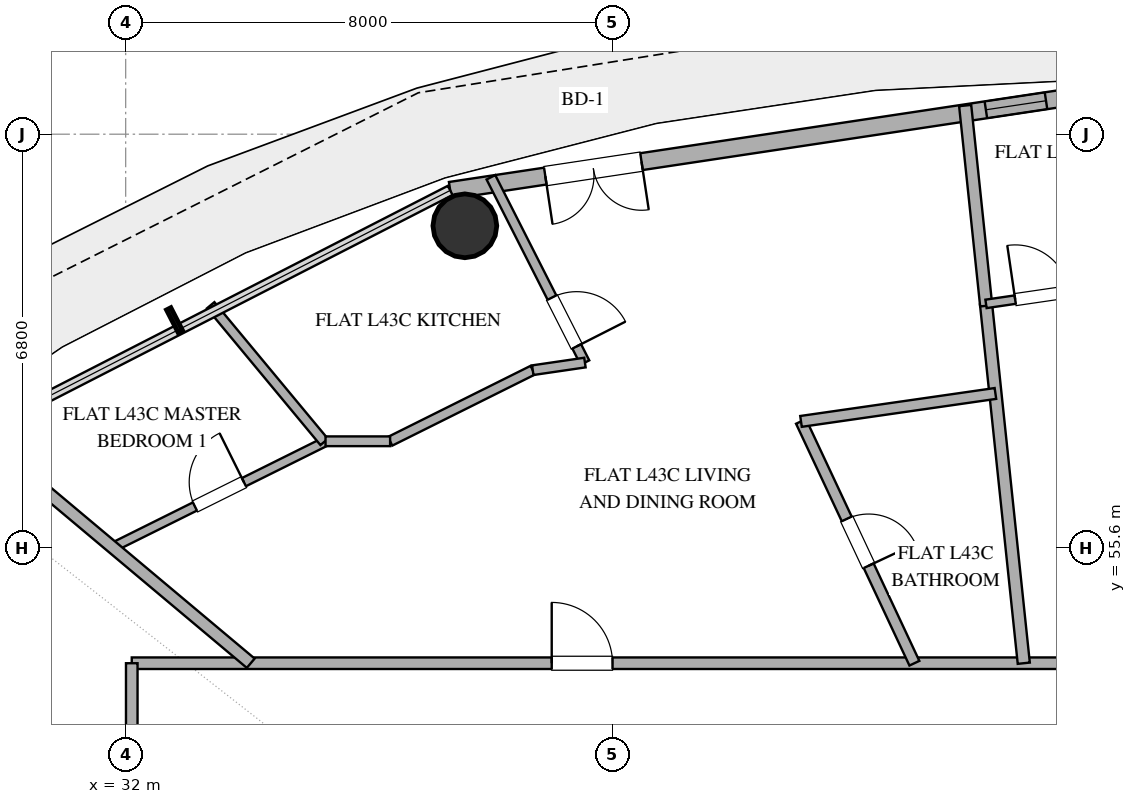
"""IFC4 building model, lengths in metres.
Left out: names, types, materials, properties, quantities, classifications, styles, units other than length and angle.
Written with IfcOpenShell. Run it as: python <this file> out.ifc"""

import sys

from ifc_helpers import new_model, si_unit, direction, frame, frame_2d, origin, origin_2d, place, context, subcontext, project, spatial, rectangle, hollow_circle, extrude, element, fill, save


model = new_model("IFC4")
c1 = context("Model", 3, precision=1e-05, world=origin(), true_north=direction((0.0, 1.0)))
c2 = subcontext(c1, "Body", "Model", "MODEL_VIEW")
j1 = project(units=[si_unit("LENGTHUNIT", "METRE"), si_unit("PLANEANGLEUNIT", "RADIAN")], contexts=[c1])
p1 = place(None, origin())
s1 = spatial("IfcSite", under=j1, at=p1, CompositionType="ELEMENT")
p2 = place(p1, origin())
s2 = spatial("IfcBuilding", under=s1, at=p2, CompositionType="ELEMENT")
p3 = place(p2, frame((0.0, 0.0, 172.2)))
s3 = spatial("IfcBuildingStorey", under=s2, at=p3, CompositionType="ELEMENT", Elevation=172.2)
p4 = place(p3, frame((37.578, 60.893, 0.0), z_axis=(0.0, 0.0, 1.0), x_axis=(1.0, 0.0, 0.0)))
e1 = element("IfcColumn", 1, at=p4, inside=s3, PredefinedType="COLUMN", context=c2, shape_type="SweptSolid", body=[
    extrude(hollow_circle(Radius=0.525, WallThickness=0.028, at=origin_2d()), origin(), (0.0, 0.0, 1.0), 3.38),
])
p5 = place(p3, frame((48.0, 63.08, 0.0), z_axis=(0.0, 0.0, 1.0), x_axis=(-0.988863993413, -0.148822049884, 0.0)))
e2 = element("IfcWall", 2, at=p5, inside=s3, PredefinedType="SOLIDWALL", context=c2, shape_type="SweptSolid", body=[
    extrude(rectangle(XDim=10.783, YDim=0.28, at=frame_2d((5.392, 0.0))), origin(), (0.0, 0.0, 1.0), 3.38),
])
p6 = place(p5, frame((7.601, 0.0, 0.0)))
e3 = element("IfcOpeningElement", 3, at=p6, cuts=e2, PredefinedType="OPENING", context=c2, shape_type="SweptSolid", body=[
    extrude(rectangle(XDim=1.6, YDim=2.25, at=frame_2d((0.8, 1.125))), frame((0.0, 0.15, 0.0), z_axis=(0.0, -1.0, 0.0), x_axis=(1.0, 0.0, 0.0)), (0.0, 0.0, 1.0), 0.3),
])
p7 = place(p5, frame((0.874, 0.0, 0.85)))
e4 = element("IfcOpeningElement", 4, at=p7, cuts=e2, PredefinedType="OPENING", context=c2, shape_type="SweptSolid", body=[
    extrude(rectangle(XDim=1.0, YDim=1.8, at=frame_2d((0.5, 0.9))), frame((0.0, 0.15, 0.0), z_axis=(0.0, -1.0, 0.0), x_axis=(1.0, 0.0, 0.0)), (0.0, 0.0, 1.0), 0.3),
])
p8 = place(p3, frame((32.1, 53.7, 0.0), z_axis=(0.0, 0.0, 1.0), x_axis=(1.0, 0.0, 0.0)))
e5 = element("IfcWall", 5, at=p8, inside=s3, PredefinedType="PARTITIONING", context=c2, shape_type="SweptSolid", body=[
    extrude(rectangle(XDim=16.061, YDim=0.19, at=frame_2d((8.03, 0.0))), origin(), (0.0, 0.0, 1.0), 2.74),
])
p9 = place(p8, frame((6.907, 0.0, 0.0)))
e6 = element("IfcOpeningElement", 6, at=p9, cuts=e5, PredefinedType="OPENING", context=c2, shape_type="SweptSolid", body=[
    extrude(rectangle(XDim=1.0, YDim=2.2, at=frame_2d((0.5, 1.1))), frame((0.0, 0.105, 0.0), z_axis=(0.0, -1.0, 0.0), x_axis=(1.0, 0.0, 0.0)), (0.0, 0.0, 1.0), 0.21),
])
p10 = place(p3, frame((32.1, 46.526, 0.0), z_axis=(0.0, 0.0, 1.0), x_axis=(0.0, 1.0, 0.0)))
e7 = element("IfcWall", 7, at=p10, inside=s3, PredefinedType="PARTITIONING", context=c2, shape_type="SweptSolid", body=[
    extrude(rectangle(XDim=7.174, YDim=0.19, at=frame_2d((3.587, 0.0))), origin(), (0.0, 0.0, 1.0), 2.74),
])
p11 = place(p10, frame((3.087, 0.0, 0.0)))
e8 = element("IfcOpeningElement", 8, at=p11, cuts=e7, PredefinedType="OPENING", context=c2, shape_type="SweptSolid", body=[
    extrude(rectangle(XDim=1.0, YDim=2.2, at=frame_2d((0.5, 1.1))), frame((0.0, 0.105, 0.0), z_axis=(0.0, -1.0, 0.0), x_axis=(1.0, 0.0, 0.0)), (0.0, 0.0, 1.0), 0.21),
])
p12 = place(p3, frame((46.77, 53.7, 0.0), z_axis=(0.0, 0.0, 1.0), x_axis=(-0.104526512024, 0.99452210045, 0.0)))
e9 = element("IfcWall", 9, at=p12, inside=s3, PredefinedType="PARTITIONING", context=c2, shape_type="SweptSolid", body=[
    extrude(rectangle(XDim=5.942, YDim=0.2, at=frame_2d((2.971, 0.0))), origin(), (0.0, 0.0, 1.0), 2.74),
])
p13 = place(p3, frame((43.106, 57.677, 0.0), z_axis=(0.0, 0.0, 1.0), x_axis=(0.424616155392, -0.905373470221, 0.0)))
e10 = element("IfcWall", 10, at=p13, inside=s3, PredefinedType="PLUMBINGWALL", context=c2, shape_type="SweptSolid", body=[
    extrude(rectangle(XDim=4.392, YDim=0.18, at=frame_2d((2.196, 0.0))), origin(), (0.0, 0.0, 1.0), 2.74),
])
p14 = place(p13, frame((1.771, 0.0, 0.0)))
e11 = element("IfcOpeningElement", 11, at=p14, cuts=e10, PredefinedType="OPENING", context=c2, shape_type="SweptSolid", body=[
    extrude(rectangle(XDim=0.85, YDim=2.1, at=frame_2d((0.425, 1.05))), frame((0.0, 0.1, 0.0), z_axis=(0.0, -1.0, 0.0), x_axis=(1.0, 0.0, 0.0)), (0.0, 0.0, 1.0), 0.2),
])
p15 = place(p3, frame((31.786, 55.605, 0.0), z_axis=(0.0, 0.0, 1.0), x_axis=(0.895458573673, 0.445144856013, 0.0)))
e12 = element("IfcWall", 12, at=p15, inside=s3, PredefinedType="PARTITIONING", context=c2, shape_type="SweptSolid", body=[
    extrude(rectangle(XDim=3.92, YDim=0.15, at=frame_2d((1.96, 0.0))), origin(), (0.0, 0.0, 1.0), 2.74),
])
p16 = place(p15, frame((1.51, 0.0, 0.0)))
e13 = element("IfcOpeningElement", 13, at=p16, cuts=e12, PredefinedType="OPENING", context=c2, shape_type="SweptSolid", body=[
    extrude(rectangle(XDim=0.9, YDim=2.1, at=frame_2d((0.45, 1.05))), frame((0.0, 0.085, 0.0), z_axis=(0.0, -1.0, 0.0), x_axis=(1.0, 0.0, 0.0)), (0.0, 0.0, 1.0), 0.17),
])
p17 = place(p3, frame((38.007, 61.691, 0.0), z_axis=(0.0, 0.0, 1.0), x_axis=(0.452578737028, -0.891724445549, 0.0)))
e14 = element("IfcWall", 14, at=p17, inside=s3, PredefinedType="PLUMBINGWALL", context=c2, shape_type="SweptSolid", body=[
    extrude(rectangle(XDim=3.417, YDim=0.16, at=frame_2d((1.708, 0.0))), origin(), (0.0, 0.0, 1.0), 2.74),
])
p18 = place(p17, frame((2.218, 0.0, 0.0)))
e15 = element("IfcOpeningElement", 15, at=p18, cuts=e14, PredefinedType="OPENING", context=c2, shape_type="SweptSolid", body=[
    extrude(rectangle(XDim=0.9, YDim=2.1, at=frame_2d((0.45, 1.05))), frame((0.0, 0.09, 0.0), z_axis=(0.0, -1.0, 0.0), x_axis=(1.0, 0.0, 0.0)), (0.0, 0.0, 1.0), 0.18),
])
p19 = place(p3, frame((45.806, 62.871, 0.0), z_axis=(0.0, 0.0, 1.0), x_axis=(0.104531289483, -0.994521598317, 0.0)))
e16 = element("IfcWall", 16, at=p19, inside=s3, PredefinedType="PARTITIONING", context=c2, shape_type="SweptSolid", body=[
    extrude(rectangle(XDim=3.312, YDim=0.2, at=frame_2d((1.656, 0.0))), origin(), (0.0, 0.0, 1.0), 2.74),
])
p20 = place(p3, frame((46.304, 58.136, 0.0), z_axis=(0.0, 0.0, 1.0), x_axis=(-0.989822126592, -0.142310075924, 0.0)))
e17 = element("IfcWall", 17, at=p20, inside=s3, PredefinedType="PLUMBINGWALL", context=c2, shape_type="SweptSolid", body=[
    extrude(rectangle(XDim=3.23, YDim=0.18, at=frame_2d((1.615, 0.0))), origin(), (0.0, 0.0, 1.0), 2.74),
])
p21 = place(p3, frame((34.056, 53.7, 0.0), z_axis=(0.0, 0.0, 1.0), x_axis=(-0.766037176398, 0.642796269728, 0.0)))
e18 = element("IfcWall", 18, at=p21, inside=s3, PredefinedType="PARTITIONING", context=c2, shape_type="SweptSolid", body=[
    extrude(rectangle(XDim=6.004, YDim=0.2, at=frame_2d((3.002, 0.0))), origin(), (0.0, 0.0, 1.0), 2.74),
])
p22 = place(p3, frame((35.264, 57.339, 0.0), z_axis=(0.0, 0.0, 1.0), x_axis=(-0.638753509407, 0.769411433643, 0.0)))
e19 = element("IfcWall", 19, at=p22, inside=s3, PredefinedType="PLUMBINGWALL", context=c2, shape_type="SweptSolid", body=[
    extrude(rectangle(XDim=2.922, YDim=0.16, at=frame_2d((1.461, 0.0))), origin(), (0.0, 0.0, 1.0), 2.74),
])
p23 = place(p3, frame((38.695, 58.519, 0.0), z_axis=(0.0, 0.0, 1.0), x_axis=(-0.895041110332, -0.445983644112, 0.0)))
e20 = element("IfcWall", 20, at=p23, inside=s3, PredefinedType="PLUMBINGWALL", context=c2, shape_type="SweptSolid", body=[
    extrude(rectangle(XDim=2.621, YDim=0.16, at=frame_2d((1.311, 0.0))), origin(), (0.0, 0.0, 1.0), 2.74),
])
p24 = place(p3, frame((46.149, 59.609, 0.0), z_axis=(0.0, 0.0, 1.0), x_axis=(0.989487501707, 0.144618408111, 0.0)))
e21 = element("IfcWall", 21, at=p24, inside=s3, PredefinedType="PARTITIONING", context=c2, shape_type="SweptSolid", body=[
    extrude(rectangle(XDim=1.871, YDim=0.14, at=frame_2d((0.935, 0.0))), origin(), (0.0, 0.0, 1.0), 2.74),
])
p25 = place(p24, frame((0.485, 0.0, 0.0)))
e22 = element("IfcOpeningElement", 22, at=p25, cuts=e21, PredefinedType="OPENING", context=c2, shape_type="SweptSolid", body=[
    extrude(rectangle(XDim=0.9, YDim=2.1, at=frame_2d((0.45, 1.05))), frame((0.0, 0.08, 0.0), z_axis=(0.0, -1.0, 0.0), x_axis=(1.0, 0.0, 0.0)), (0.0, 0.0, 1.0), 0.16),
])
p26 = place(p3, frame((36.349, 57.35, 0.0), z_axis=(0.0, 0.0, 1.0), x_axis=(-1.0, 0.0, 0.0)))
e23 = element("IfcWall", 23, at=p26, inside=s3, PredefinedType="PLUMBINGWALL", context=c2, shape_type="SweptSolid", body=[
    extrude(rectangle(XDim=1.062, YDim=0.16, at=frame_2d((0.531, 0.0))), origin(), (0.0, 0.0, 1.0), 2.74),
])
p27 = place(p3, frame((39.553, 58.645, 0.0), z_axis=(0.0, 0.0, 1.0), x_axis=(-0.989476797437, -0.144691628416, 0.0)))
e24 = element("IfcWall", 24, at=p27, inside=s3, PredefinedType="PLUMBINGWALL", context=c2, shape_type="SweptSolid", body=[
    extrude(rectangle(XDim=0.867, YDim=0.16, at=frame_2d((0.434, 0.0))), origin(), (0.0, 0.0, 1.0), 2.74),
])
p28 = place(p6, origin())
e25 = element("IfcDoor", 25, at=p28, inside=s3, OperationType="DOUBLE_DOOR_SINGLE_SWING", PredefinedType="DOOR", context=c2, shape_type="SweptSolid", body=[
    extrude(rectangle(XDim=1.6, YDim=2.25, at=frame_2d((0.8, 1.125))), frame((0.0, 0.025, 0.0), z_axis=(0.0, -1.0, 0.0), x_axis=(1.0, 0.0, 0.0)), (0.0, 0.0, 1.0), 0.05),
])
fill(e3, e25)
p29 = place(p7, origin())
e26 = element("IfcWindow", 26, at=p29, inside=s3, PartitioningType="SINGLE_PANEL", PredefinedType="WINDOW", context=c2, shape_type="SweptSolid", body=[
    extrude(rectangle(XDim=1.0, YDim=1.8, at=frame_2d((0.5, 0.9))), frame((0.0, 0.03, 0.0), z_axis=(0.0, -1.0, 0.0), x_axis=(1.0, 0.0, 0.0)), (0.0, 0.0, 1.0), 0.06),
])
fill(e4, e26)
p30 = place(p9, origin())
e27 = element("IfcDoor", 27, at=p30, inside=s3, OperationType="SINGLE_SWING_LEFT", PredefinedType="DOOR", context=c2, shape_type="SweptSolid", body=[
    extrude(rectangle(XDim=1.0, YDim=2.2, at=frame_2d((0.5, 1.1))), frame((0.0, 0.025, 0.0), z_axis=(0.0, -1.0, 0.0), x_axis=(1.0, 0.0, 0.0)), (0.0, 0.0, 1.0), 0.05),
])
fill(e6, e27)
p31 = place(p14, origin())
e28 = element("IfcDoor", 28, at=p31, inside=s3, OperationType="SINGLE_SWING_RIGHT", PredefinedType="DOOR", context=c2, shape_type="SweptSolid", body=[
    extrude(rectangle(XDim=0.85, YDim=2.1, at=frame_2d((0.425, 1.05))), frame((0.0, 0.025, 0.0), z_axis=(0.0, -1.0, 0.0), x_axis=(1.0, 0.0, 0.0)), (0.0, 0.0, 1.0), 0.05),
])
fill(e11, e28)
p32 = place(p16, origin())
e29 = element("IfcDoor", 29, at=p32, inside=s3, OperationType="SINGLE_SWING_RIGHT", PredefinedType="DOOR", context=c2, shape_type="SweptSolid", body=[
    extrude(rectangle(XDim=0.9, YDim=2.1, at=frame_2d((0.45, 1.05))), frame((0.0, 0.025, 0.0), z_axis=(0.0, -1.0, 0.0), x_axis=(1.0, 0.0, 0.0)), (0.0, 0.0, 1.0), 0.05),
])
fill(e13, e29)
p33 = place(p18, origin())
e30 = element("IfcDoor", 30, at=p33, inside=s3, OperationType="SINGLE_SWING_RIGHT", PredefinedType="DOOR", context=c2, shape_type="SweptSolid", body=[
    extrude(rectangle(XDim=0.9, YDim=2.1, at=frame_2d((0.45, 1.05))), frame((0.0, 0.025, 0.0), z_axis=(0.0, -1.0, 0.0), x_axis=(1.0, 0.0, 0.0)), (0.0, 0.0, 1.0), 0.05),
])
fill(e15, e30)
p34 = place(p25, origin())
e31 = element("IfcDoor", 31, at=p34, inside=s3, OperationType="SINGLE_SWING_LEFT", PredefinedType="DOOR", context=c2, shape_type="SweptSolid", body=[
    extrude(rectangle(XDim=0.9, YDim=2.1, at=frame_2d((0.45, 1.05))), frame((0.0, 0.025, 0.0), z_axis=(0.0, -1.0, 0.0), x_axis=(1.0, 0.0, 0.0)), (0.0, 0.0, 1.0), 0.05),
])
fill(e22, e31)
save(model, sys.argv[1])
